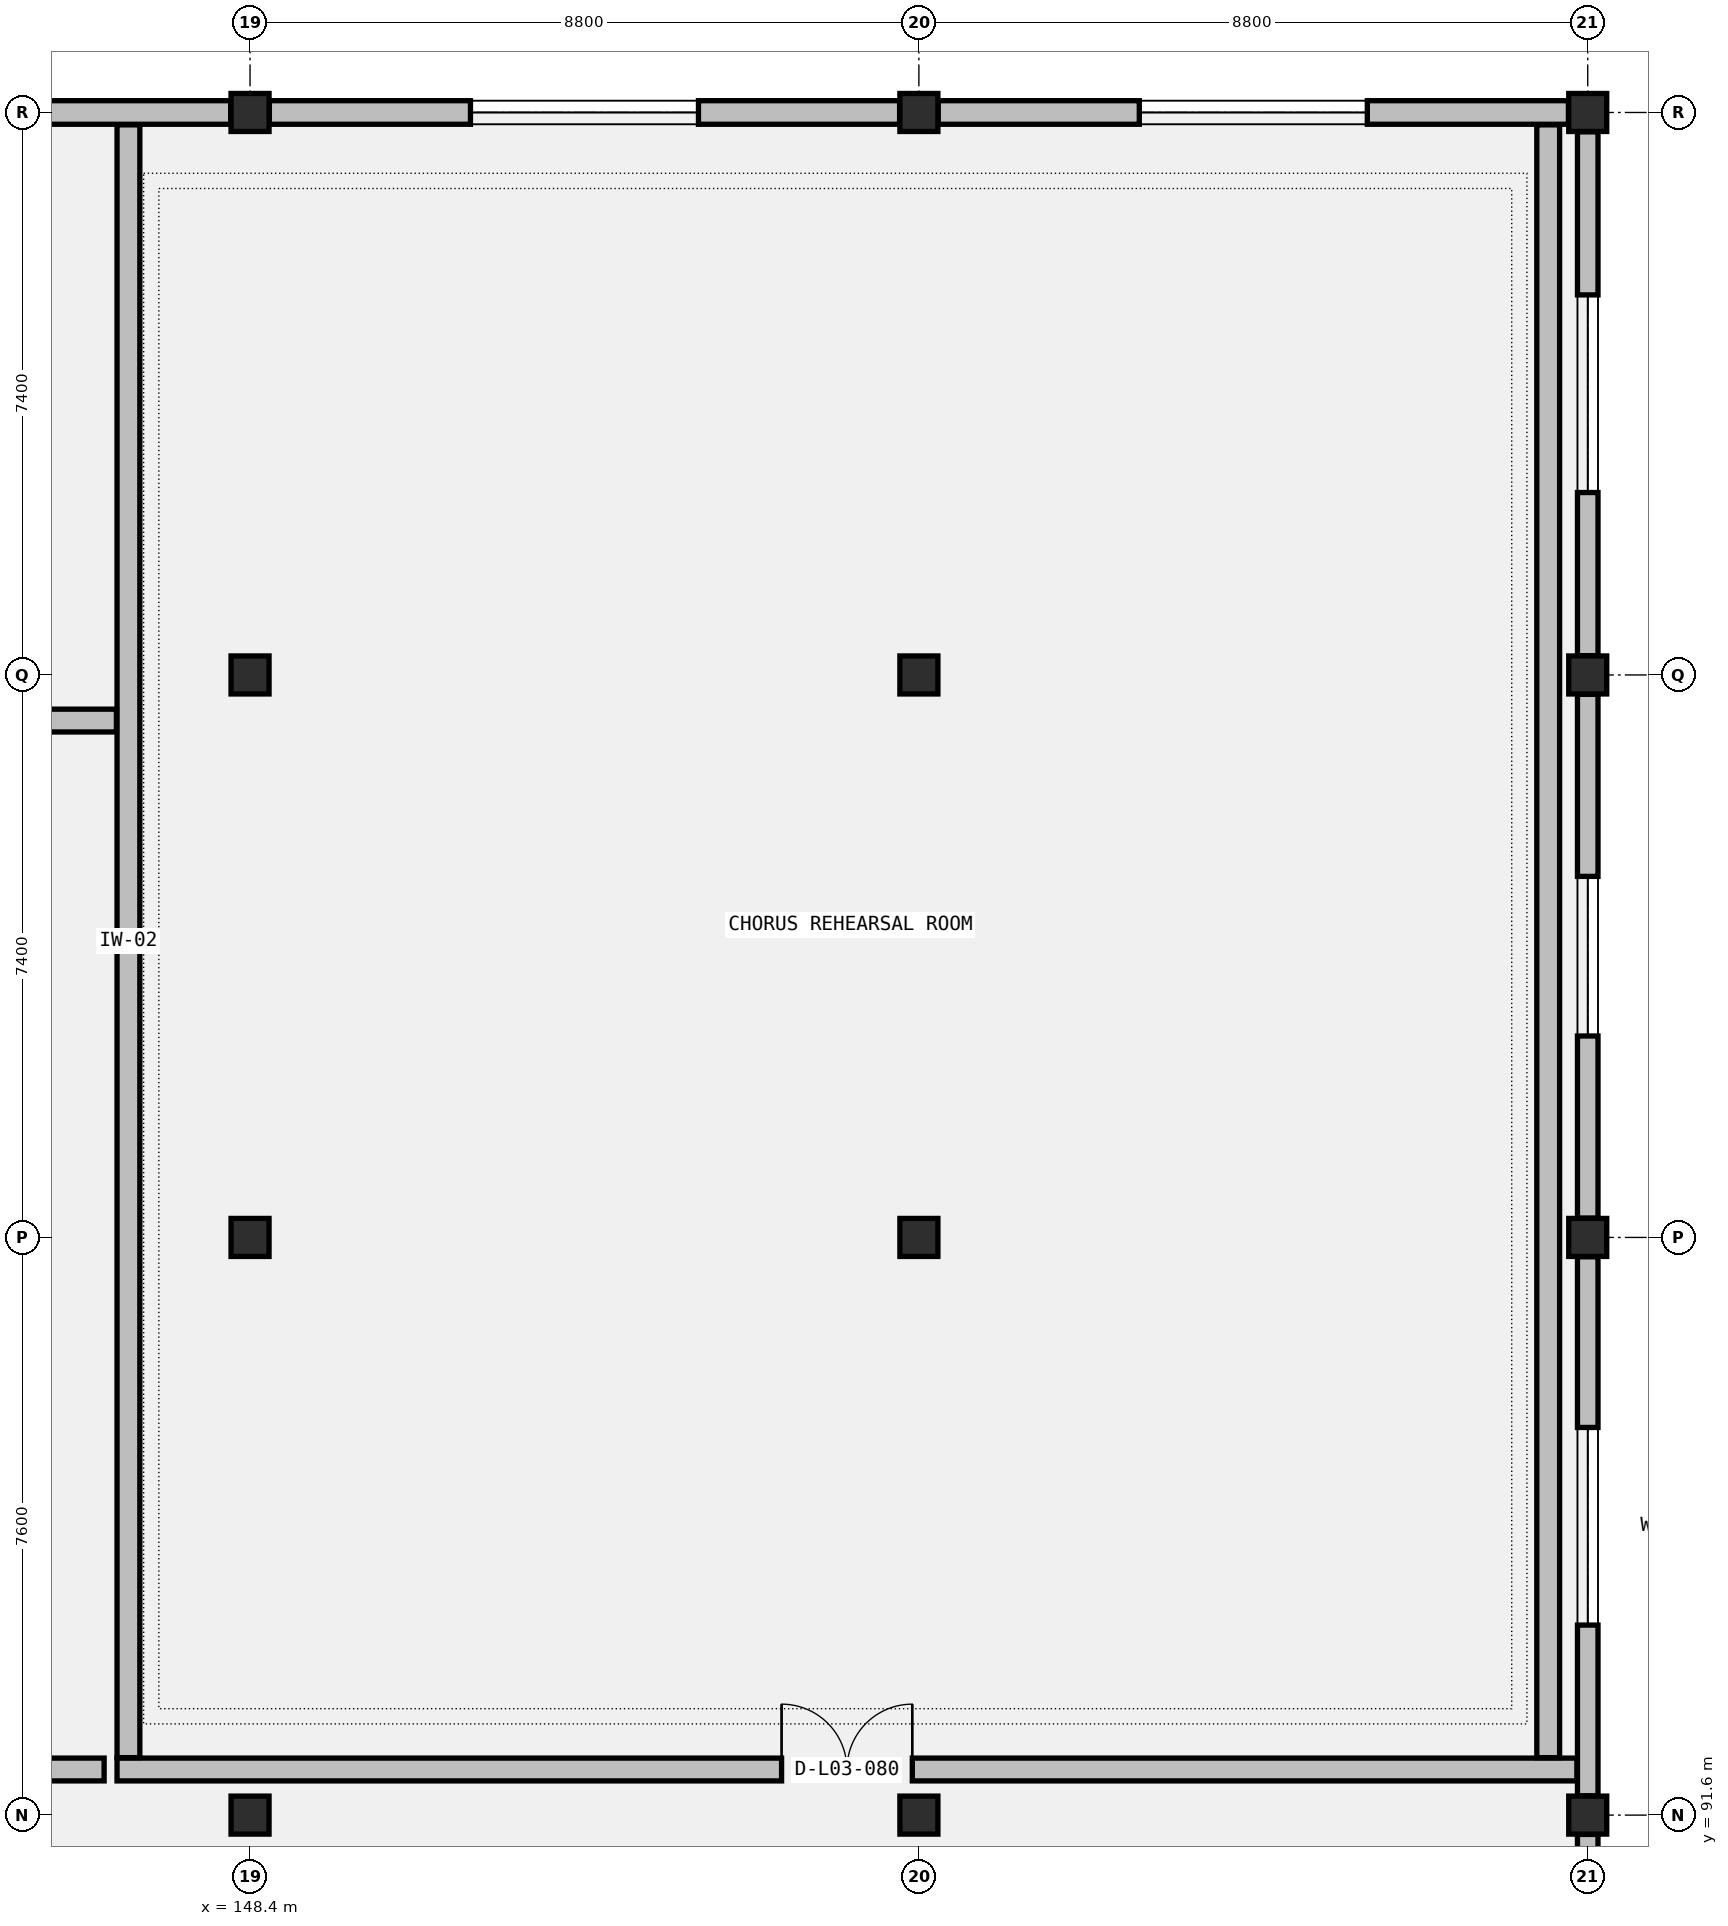
"""IFC4 building model, lengths in metres.
Left out: names, types, materials, properties, quantities, classifications, styles, units other than length and angle.
Written with IfcOpenShell. Run it as: python <this file> out.ifc"""

import sys

from ifc_helpers import new_model, si_unit, direction, frame, frame_2d, origin, origin_2d, place, context, subcontext, project, spatial, rectangle, extrude, element, fill, save


model = new_model("IFC4")
c1 = context("Model", 3, precision=1e-05, world=origin(), true_north=direction((0.0, 1.0)))
c2 = subcontext(c1, "Body", "Model", "MODEL_VIEW")
j1 = project(units=[si_unit("LENGTHUNIT", "METRE"), si_unit("PLANEANGLEUNIT", "RADIAN")], contexts=[c1])
p1 = place(None, origin())
s1 = spatial("IfcSite", under=j1, at=p1, CompositionType="ELEMENT")
p2 = place(p1, origin())
s2 = spatial("IfcBuilding", under=s1, at=p2, CompositionType="ELEMENT")
p3 = place(p2, frame((0.0, 0.0, 14.6)))
s3 = spatial("IfcBuildingStorey", under=s2, at=p3, CompositionType="ELEMENT", Elevation=14.6)
for number, where, z_axis, x_axis in (
    (1, (148.4, 91.6, 0.0), (0.0, 0.0, 1.0), (1.0, 0.0, 0.0)),
    (2, (148.4, 99.2, 0.0), (0.0, 0.0, 1.0), (1.0, 0.0, 0.0)),
    (3, (148.4, 106.6, 0.0), (0.0, 0.0, 1.0), (1.0, 0.0, 0.0)),
    (4, (148.4, 114.0, 0.0), (0.0, 0.0, 1.0), (1.0, 0.0, 0.0)),
    (5, (157.2, 91.6, 0.0), (0.0, 0.0, 1.0), (1.0, 0.0, 0.0)),
    (6, (157.2, 99.2, 0.0), (0.0, 0.0, 1.0), (1.0, 0.0, 0.0)),
    (7, (157.2, 106.6, 0.0), (0.0, 0.0, 1.0), (1.0, 0.0, 0.0)),
    (8, (157.2, 114.0, 0.0), (0.0, 0.0, 1.0), (1.0, 0.0, 0.0)),
    (9, (166.0, 91.6, 0.0), (0.0, 0.0, 1.0), (1.0, 0.0, 0.0)),
    (10, (166.0, 99.2, 0.0), (0.0, 0.0, 1.0), (1.0, 0.0, 0.0)),
    (11, (166.0, 106.6, 0.0), (0.0, 0.0, 1.0), (1.0, 0.0, 0.0)),
    (12, (166.0, 114.0, 0.0), (0.0, 0.0, 1.0), (1.0, 0.0, 0.0)),
):
    element("IfcColumn", number, at=place(p3, frame(where, z_axis=z_axis, x_axis=x_axis)), inside=s3, PredefinedType="COLUMN", context=c2, shape_type="SweptSolid", body=[
        extrude(rectangle(XDim=0.5, YDim=0.5, at=origin_2d()), origin(), (0.0, 0.0, 1.0), 4.6),
    ])
p4 = place(p3, frame((139.654, 114.0, 0.0), z_axis=(0.0, 0.0, 1.0), x_axis=(1.0, 0.0, 0.0)))
e13 = element("IfcWall", 13, at=p4, inside=s3, PredefinedType="STANDARD", context=c2, shape_type="SweptSolid", body=[
    extrude(rectangle(XDim=8.492, YDim=0.31, at=frame_2d((4.246, 0.0))), origin(), (0.0, 0.0, 1.0), 3.898),
])
p5 = place(p4, frame((2.746, 0.0, 0.9)))
e14 = element("IfcOpeningElement", 14, at=p5, cuts=e13, PredefinedType="OPENING", context=c2, shape_type="SweptSolid", body=[
    extrude(rectangle(XDim=3.0, YDim=2.1, at=frame_2d((1.5, 1.05))), frame((0.0, 0.165, 0.0), z_axis=(0.0, -1.0, 0.0), x_axis=(1.0, 0.0, 0.0)), (0.0, 0.0, 1.0), 0.33),
])
p6 = place(p3, frame((148.654, 114.0, 0.0), z_axis=(0.0, 0.0, 1.0), x_axis=(1.0, 0.0, 0.0)))
e15 = element("IfcWall", 15, at=p6, inside=s3, PredefinedType="STANDARD", context=c2, shape_type="SweptSolid", body=[
    extrude(rectangle(XDim=8.292, YDim=0.31, at=frame_2d((4.146, 0.0))), origin(), (0.0, 0.0, 1.0), 3.818),
])
p7 = place(p6, frame((2.646, 0.0, 0.9)))
e16 = element("IfcOpeningElement", 16, at=p7, cuts=e15, PredefinedType="OPENING", context=c2, shape_type="SweptSolid", body=[
    extrude(rectangle(XDim=3.0, YDim=2.1, at=frame_2d((1.5, 1.05))), frame((0.0, 0.165, 0.0), z_axis=(0.0, -1.0, 0.0), x_axis=(1.0, 0.0, 0.0)), (0.0, 0.0, 1.0), 0.33),
])
p8 = place(p3, frame((157.454, 114.0, 0.0), z_axis=(0.0, 0.0, 1.0), x_axis=(1.0, 0.0, 0.0)))
e17 = element("IfcWall", 17, at=p8, inside=s3, PredefinedType="STANDARD", context=c2, shape_type="SweptSolid", body=[
    extrude(rectangle(XDim=8.292, YDim=0.31, at=frame_2d((4.146, 0.0))), origin(), (0.0, 0.0, 1.0), 3.818),
])
p9 = place(p8, frame((2.646, 0.0, 0.9)))
e18 = element("IfcOpeningElement", 18, at=p9, cuts=e17, PredefinedType="OPENING", context=c2, shape_type="SweptSolid", body=[
    extrude(rectangle(XDim=3.0, YDim=2.1, at=frame_2d((1.5, 1.05))), frame((0.0, 0.165, 0.0), z_axis=(0.0, -1.0, 0.0), x_axis=(1.0, 0.0, 0.0)), (0.0, 0.0, 1.0), 0.33),
])
p10 = place(p3, frame((166.0, 84.254, 0.0), z_axis=(0.0, 0.0, 1.0), x_axis=(0.0, 1.0, 0.0)))
e19 = element("IfcWall", 19, at=p10, inside=s3, PredefinedType="STANDARD", context=c2, shape_type="SweptSolid", body=[
    extrude(rectangle(XDim=7.092, YDim=0.27, at=frame_2d((3.546, 0.0))), origin(), (0.0, 0.0, 1.0), 3.818),
])
p11 = place(p10, frame((2.496, 0.0, 0.9)))
e20 = element("IfcOpeningElement", 20, at=p11, cuts=e19, PredefinedType="OPENING", context=c2, shape_type="SweptSolid", body=[
    extrude(rectangle(XDim=2.1, YDim=1.8, at=frame_2d((1.05, 0.9))), frame((0.0, 0.145, 0.0), z_axis=(0.0, -1.0, 0.0), x_axis=(1.0, 0.0, 0.0)), (0.0, 0.0, 1.0), 0.29),
])
p12 = place(p3, frame((166.0, 91.854, 0.0), z_axis=(0.0, 0.0, 1.0), x_axis=(0.0, 1.0, 0.0)))
e21 = element("IfcWall", 21, at=p12, inside=s3, PredefinedType="STANDARD", context=c2, shape_type="SweptSolid", body=[
    extrude(rectangle(XDim=7.092, YDim=0.27, at=frame_2d((3.546, 0.0))), origin(), (0.0, 0.0, 1.0), 3.818),
])
p13 = place(p12, frame((2.246, 0.0, 0.9)))
e22 = element("IfcOpeningElement", 22, at=p13, cuts=e21, PredefinedType="OPENING", context=c2, shape_type="SweptSolid", body=[
    extrude(rectangle(XDim=2.6, YDim=2.2, at=frame_2d((1.3, 1.1))), frame((0.0, 0.145, 0.0), z_axis=(0.0, -1.0, 0.0), x_axis=(1.0, 0.0, 0.0)), (0.0, 0.0, 1.0), 0.29),
])
p14 = place(p3, frame((166.0, 99.454, 0.0), z_axis=(0.0, 0.0, 1.0), x_axis=(0.0, 1.0, 0.0)))
e23 = element("IfcWall", 23, at=p14, inside=s3, PredefinedType="STANDARD", context=c2, shape_type="SweptSolid", body=[
    extrude(rectangle(XDim=6.892, YDim=0.27, at=frame_2d((3.446, 0.0))), origin(), (0.0, 0.0, 1.0), 3.818),
])
p15 = place(p14, frame((2.396, 0.0, 0.9)))
e24 = element("IfcOpeningElement", 24, at=p15, cuts=e23, PredefinedType="OPENING", context=c2, shape_type="SweptSolid", body=[
    extrude(rectangle(XDim=2.1, YDim=1.8, at=frame_2d((1.05, 0.9))), frame((0.0, 0.145, 0.0), z_axis=(0.0, -1.0, 0.0), x_axis=(1.0, 0.0, 0.0)), (0.0, 0.0, 1.0), 0.29),
])
p16 = place(p3, frame((166.0, 106.854, 0.0), z_axis=(0.0, 0.0, 1.0), x_axis=(0.0, 1.0, 0.0)))
e25 = element("IfcWall", 25, at=p16, inside=s3, PredefinedType="STANDARD", context=c2, shape_type="SweptSolid", body=[
    extrude(rectangle(XDim=6.892, YDim=0.27, at=frame_2d((3.446, 0.0))), origin(), (0.0, 0.0, 1.0), 3.818),
])
p17 = place(p16, frame((2.146, 0.0, 0.9)))
e26 = element("IfcOpeningElement", 26, at=p17, cuts=e25, PredefinedType="OPENING", context=c2, shape_type="SweptSolid", body=[
    extrude(rectangle(XDim=2.6, YDim=2.2, at=frame_2d((1.3, 1.1))), frame((0.0, 0.145, 0.0), z_axis=(0.0, -1.0, 0.0), x_axis=(1.0, 0.0, 0.0)), (0.0, 0.0, 1.0), 0.29),
])
p18 = place(p3, frame((146.65, 92.2, 0.0), z_axis=(0.0, 0.0, 1.0), x_axis=(1.0, 0.0, 0.0)))
e27 = element("IfcWall", 27, at=p18, inside=s3, PredefinedType="PARTITIONING", context=c2, shape_type="SweptSolid", body=[
    extrude(rectangle(XDim=19.207, YDim=0.3, at=frame_2d((9.604, 0.0))), origin(), (0.0, 0.0, 1.0), 3.908),
])
p19 = place(p18, frame((8.743, 0.0, 0.0)))
e28 = element("IfcOpeningElement", 28, at=p19, cuts=e27, PredefinedType="OPENING", context=c2, shape_type="SweptSolid", body=[
    extrude(rectangle(XDim=1.72, YDim=2.38, at=frame_2d((0.86, 1.19))), frame((0.0, 0.16, 0.0), z_axis=(0.0, -1.0, 0.0), x_axis=(1.0, 0.0, 0.0)), (0.0, 0.0, 1.0), 0.32),
])
p20 = place(p3, frame((146.8, 92.356, 0.0), z_axis=(0.0, 0.0, 1.0), x_axis=(0.0, 1.0, 0.0)))
e29 = element("IfcWall", 29, at=p20, inside=s3, PredefinedType="PARTITIONING", context=c2, shape_type="SweptSolid", body=[
    extrude(rectangle(XDim=21.481, YDim=0.3, at=frame_2d((10.74, 0.0))), origin(), (0.0, 0.0, 1.0), 3.898),
])
p21 = place(p3, frame((165.48, 92.356, 0.0), z_axis=(0.0, 0.0, 1.0), x_axis=(0.0, 1.0, 0.0)))
e30 = element("IfcWall", 30, at=p21, inside=s3, PredefinedType="PARTITIONING", context=c2, shape_type="SweptSolid", body=[
    extrude(rectangle(XDim=21.481, YDim=0.3, at=frame_2d((10.74, 0.0))), origin(), (0.0, 0.0, 1.0), 3.818),
])
p22 = place(p3, frame((143.383, 92.2, 0.0), z_axis=(0.0, 0.0, 1.0), x_axis=(1.0, 0.0, 0.0)))
e31 = element("IfcWall", 31, at=p22, inside=s3, PredefinedType="PARTITIONING", context=c2, shape_type="SweptSolid", body=[
    extrude(rectangle(XDim=3.097, YDim=0.3, at=frame_2d((1.549, 0.0))), origin(), (0.0, 0.0, 1.0), 3.988),
])
p23 = place(p3, frame((132.32, 106.0, 0.0), z_axis=(0.0, 0.0, 1.0), x_axis=(1.0, 0.0, 0.0)))
e32 = element("IfcWall", 32, at=p23, inside=s3, PredefinedType="PARTITIONING", context=c2, shape_type="SweptSolid", body=[
    extrude(rectangle(XDim=14.322, YDim=0.3, at=frame_2d((7.161, 0.0))), origin(), (0.0, 0.0, 1.0), 3.988),
])
p24 = place(p7, origin())
e33 = element("IfcWindow", 33, at=p24, inside=s3, PartitioningType="TRIPLE_PANEL_VERTICAL", PredefinedType="WINDOW", context=c2, shape_type="SweptSolid", body=[
    extrude(rectangle(XDim=3.0, YDim=2.1, at=frame_2d((1.5, 1.05))), frame((0.0, 0.03, 0.0), z_axis=(0.0, -1.0, 0.0), x_axis=(1.0, 0.0, 0.0)), (0.0, 0.0, 1.0), 0.06),
])
fill(e16, e33)
p25 = place(p9, origin())
e34 = element("IfcWindow", 34, at=p25, inside=s3, PartitioningType="TRIPLE_PANEL_VERTICAL", PredefinedType="WINDOW", context=c2, shape_type="SweptSolid", body=[
    extrude(rectangle(XDim=3.0, YDim=2.1, at=frame_2d((1.5, 1.05))), frame((0.0, 0.03, 0.0), z_axis=(0.0, -1.0, 0.0), x_axis=(1.0, 0.0, 0.0)), (0.0, 0.0, 1.0), 0.06),
])
fill(e18, e34)
p26 = place(p13, origin())
e35 = element("IfcWindow", 35, at=p26, inside=s3, PartitioningType="DOUBLE_PANEL_VERTICAL", PredefinedType="WINDOW", context=c2, shape_type="SweptSolid", body=[
    extrude(rectangle(XDim=2.6, YDim=2.2, at=frame_2d((1.3, 1.1))), frame((0.0, 0.03, 0.0), z_axis=(0.0, -1.0, 0.0), x_axis=(1.0, 0.0, 0.0)), (0.0, 0.0, 1.0), 0.06),
])
fill(e22, e35)
p27 = place(p15, origin())
e36 = element("IfcWindow", 36, at=p27, inside=s3, PartitioningType="DOUBLE_PANEL_VERTICAL", PredefinedType="WINDOW", context=c2, shape_type="SweptSolid", body=[
    extrude(rectangle(XDim=2.1, YDim=1.8, at=frame_2d((1.05, 0.9))), frame((0.0, 0.03, 0.0), z_axis=(0.0, -1.0, 0.0), x_axis=(1.0, 0.0, 0.0)), (0.0, 0.0, 1.0), 0.06),
])
fill(e24, e36)
p28 = place(p17, origin())
e37 = element("IfcWindow", 37, at=p28, inside=s3, PartitioningType="DOUBLE_PANEL_VERTICAL", PredefinedType="WINDOW", context=c2, shape_type="SweptSolid", body=[
    extrude(rectangle(XDim=2.6, YDim=2.2, at=frame_2d((1.3, 1.1))), frame((0.0, 0.03, 0.0), z_axis=(0.0, -1.0, 0.0), x_axis=(1.0, 0.0, 0.0)), (0.0, 0.0, 1.0), 0.06),
])
fill(e26, e37)
p29 = place(p19, origin())
e38 = element("IfcDoor", 38, at=p29, inside=s3, OperationType="DOUBLE_DOOR_SINGLE_SWING", PredefinedType="DOOR", context=c2, shape_type="SweptSolid", body=[
    extrude(rectangle(XDim=1.72, YDim=2.38, at=frame_2d((0.86, 1.19))), frame((0.0, 0.025, 0.0), z_axis=(0.0, -1.0, 0.0), x_axis=(1.0, 0.0, 0.0)), (0.0, 0.0, 1.0), 0.05),
])
fill(e28, e38)
save(model, sys.argv[1])
